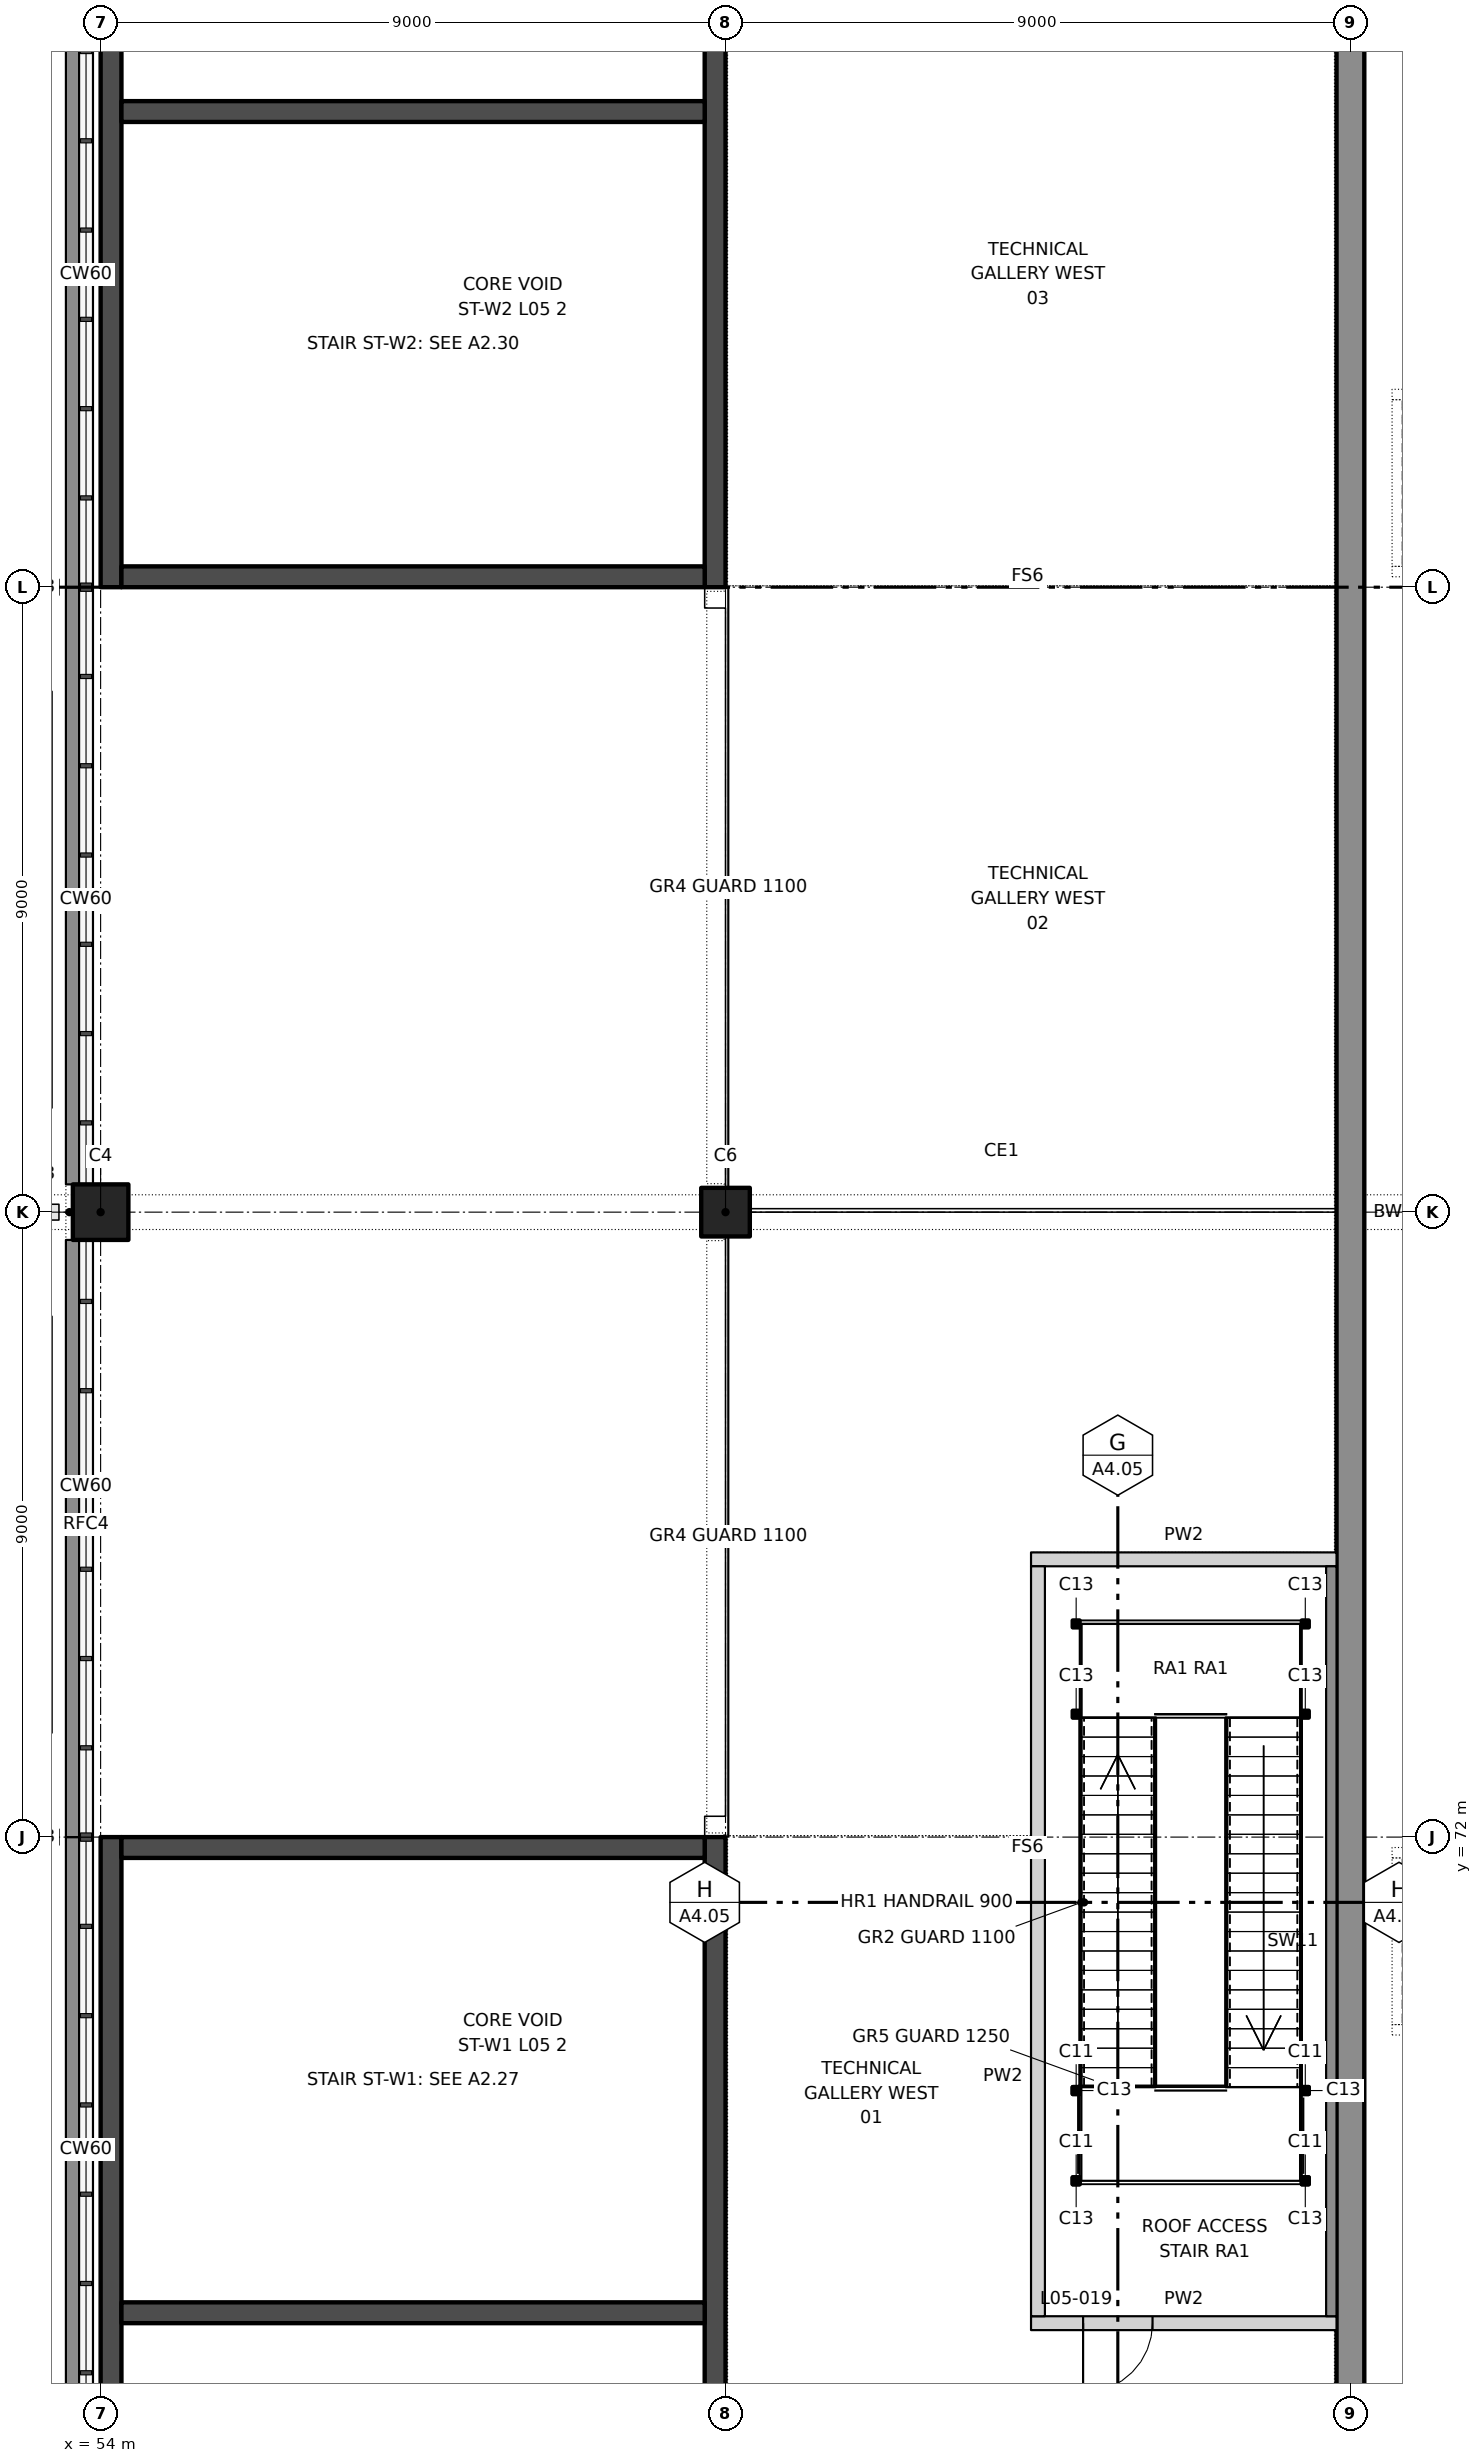
"""IFC4 building model, lengths in metres.
Left out: names, types, materials, properties, quantities, classifications, styles, units other than length and angle.
Written with IfcOpenShell. Run it as: python <this file> out.ifc"""

import sys

from ifc_helpers import new_model, si_unit, direction, frame, frame_2d, origin, origin_2d, place, context, subcontext, project, spatial, rectangle, hollow_rectangle, extrude, element, fill, save


model = new_model("IFC4")
c1 = context("Model", 3, precision=1e-05, world=origin(), true_north=direction((0.0, 1.0)))
c2 = subcontext(c1, "Body", "Model", "MODEL_VIEW")
j1 = project(units=[si_unit("LENGTHUNIT", "METRE"), si_unit("PLANEANGLEUNIT", "RADIAN")], contexts=[c1])
p1 = place(None, origin())
s1 = spatial("IfcSite", under=j1, at=p1, CompositionType="ELEMENT")
p2 = place(p1, origin())
s2 = spatial("IfcBuilding", under=s1, at=p2, CompositionType="ELEMENT")
p3 = place(p2, frame((0.0, 0.0, 33.5)))
s3 = spatial("IfcBuildingStorey", under=s2, at=p3, CompositionType="ELEMENT", Elevation=33.5)
p4 = place(p3, frame((54.0, 81.0, 0.0), z_axis=(0.0, 0.0, 1.0), x_axis=(1.0, 0.0, 0.0)))
e1 = element("IfcColumn", 1, at=p4, inside=s3, PredefinedType="COLUMN", context=c2, shape_type="SweptSolid", body=[
    extrude(rectangle(XDim=0.8, YDim=0.8, at=origin_2d()), origin(), (0.0, 0.0, 1.0), 4.0),
])
p5 = place(p3, frame((63.0, 81.0, 0.0), z_axis=(0.0, 0.0, 1.0), x_axis=(1.0, 0.0, 0.0)))
e2 = element("IfcColumn", 2, at=p5, inside=s3, PredefinedType="COLUMN", context=c2, shape_type="SweptSolid", body=[
    extrude(rectangle(XDim=0.7, YDim=0.7, at=origin_2d()), origin(), (0.0, 0.0, 1.0), 4.0),
])
p6 = place(p3, frame((72.0, 99.0, 0.0), z_axis=(0.0, 0.0, 1.0), x_axis=(0.0, -1.0, 0.0)))
e3 = element("IfcWall", 3, at=p6, inside=s3, PredefinedType="SOLIDWALL", context=c2, shape_type="SweptSolid", body=[
    extrude(rectangle(XDim=36.0, YDim=0.4, at=frame_2d((18.0, 0.0))), origin(), (0.0, 0.0, 1.0), 4.0),
])
p7 = place(p2, frame((0.0, 0.0, 28.0)))
s4 = spatial("IfcBuildingStorey", under=s2, at=p7, CompositionType="ELEMENT", Elevation=28.0)
p8 = place(p7, frame((54.4, 81.0, 0.0), z_axis=(0.0, 0.0, 1.0), x_axis=(1.0, 0.0, 0.0)))
e4 = element("IfcWall", 4, at=p8, inside=s4, PredefinedType="PARTITIONING", context=c2, shape_type="SweptSolid", body=[
    extrude(rectangle(XDim=8.25, YDim=0.15, at=frame_2d((4.125, 0.0))), origin(), (0.0, 0.0, 1.0), 9.5),
])
p9 = place(p3, frame((67.4, 65.0, 0.0), z_axis=(0.0, 0.0, 1.0), x_axis=(1.0, 0.0, 0.0)))
e5 = element("IfcWall", 5, at=p9, inside=s3, PredefinedType="PARTITIONING", context=c2, shape_type="SweptSolid", body=[
    extrude(rectangle(XDim=4.4, YDim=0.2, at=frame_2d((2.2, 0.0))), origin(), (0.0, 0.0, 1.0), 12.85),
])
p10 = place(p9, frame((0.75, 0.0, 0.0)))
e6 = element("IfcOpeningElement", 6, at=p10, cuts=e5, PredefinedType="OPENING", context=c2, shape_type="SweptSolid", body=[
    extrude(rectangle(XDim=1.0, YDim=2.1, at=frame_2d((0.5, 1.05))), frame((0.0, 0.11, 0.0), z_axis=(0.0, -1.0, 0.0), x_axis=(1.0, 0.0, 0.0)), (0.0, 0.0, 1.0), 0.22),
])
p11 = place(p3, frame((67.4, 76.0, 0.0), z_axis=(0.0, 0.0, 1.0), x_axis=(1.0, 0.0, 0.0)))
e7 = element("IfcWall", 7, at=p11, inside=s3, PredefinedType="PARTITIONING", context=c2, shape_type="SweptSolid", body=[
    extrude(rectangle(XDim=4.4, YDim=0.2, at=frame_2d((2.2, 0.0))), origin(), (0.0, 0.0, 1.0), 12.85),
])
p12 = place(p3, frame((67.5, 65.1, 0.0), z_axis=(0.0, 0.0, 1.0), x_axis=(0.0, 1.0, 0.0)))
e8 = element("IfcWall", 8, at=p12, inside=s3, PredefinedType="PARTITIONING", context=c2, shape_type="SweptSolid", body=[
    extrude(rectangle(XDim=6.9, YDim=0.2, at=frame_2d((3.45, 0.0))), origin(), (0.0, 0.0, 1.0), 12.85),
])
p13 = place(p3, frame((67.5, 72.0, 0.0), z_axis=(0.0, 0.0, 1.0), x_axis=(0.0, 1.0, 0.0)))
e9 = element("IfcWall", 9, at=p13, inside=s3, PredefinedType="PARTITIONING", context=c2, shape_type="SweptSolid", body=[
    extrude(rectangle(XDim=3.9, YDim=0.2, at=frame_2d((1.95, 0.0))), origin(), (0.0, 0.0, 1.0), 12.85),
])
p14 = place(p3, frame((53.675, 72.0, 0.0), z_axis=(0.0, 0.0, 1.0), x_axis=(0.0, -1.0, 0.0)))
e10 = element("IfcWall", 10, at=p14, inside=s3, PredefinedType="SOLIDWALL", context=c2, shape_type="SweptSolid", body=[
    extrude(rectangle(XDim=9.0, YDim=0.35, at=frame_2d((4.5, 0.0))), origin(), (0.0, 0.0, 1.0), 4.0),
])
for number, where, z_axis, x_axis in (
    (11, (53.65, 80.6, 0.0), (0.0, 0.0, 1.0), (0.0, -1.0, 0.0)),
    (12, (53.65, 90.0, 0.0), (0.0, 0.0, 1.0), (0.0, -1.0, 0.0)),
):
    element("IfcWall", number, at=place(p3, frame(where, z_axis=z_axis, x_axis=x_axis)), inside=s3, PredefinedType="SOLIDWALL", context=c2, shape_type="SweptSolid", body=[
        extrude(rectangle(XDim=8.6, YDim=0.3, at=frame_2d((4.3, 0.0))), origin(), (0.0, 0.0, 1.0), 4.0),
    ])
p15 = place(p3, frame((53.675, 99.0, 0.0), z_axis=(0.0, 0.0, 1.0), x_axis=(0.0, -1.0, 0.0)))
e13 = element("IfcWall", 13, at=p15, inside=s3, PredefinedType="SOLIDWALL", context=c2, shape_type="SweptSolid", body=[
    extrude(rectangle(XDim=9.0, YDim=0.35, at=frame_2d((4.5, 0.0))), origin(), (0.0, 0.0, 1.0), 4.0),
])
p16 = place(p3, frame((62.85, 54.0, 0.0), z_axis=(0.0, 0.0, 1.0), x_axis=(0.0, 1.0, 0.0)))
e14 = element("IfcWall", 14, at=p16, inside=s3, PredefinedType="SHEAR", context=c2, shape_type="SweptSolid", body=[
    extrude(rectangle(XDim=18.0, YDim=0.3, at=frame_2d((9.0, 0.0))), origin(), (0.0, 0.0, 1.0), 4.0),
])
p17 = place(p16, frame((8.6, 0.0, 0.0)))
e15 = element("IfcOpeningElement", 15, at=p17, cuts=e14, PredefinedType="OPENING", context=c2, shape_type="SweptSolid", body=[
    extrude(rectangle(XDim=1.2, YDim=2.1, at=frame_2d((0.6, 1.05))), frame((0.0, 0.16, 0.0), z_axis=(0.0, -1.0, 0.0), x_axis=(1.0, 0.0, 0.0)), (0.0, 0.0, 1.0), 0.32),
])
p18 = place(p3, frame((54.15, 54.0, 0.0), z_axis=(0.0, 0.0, 1.0), x_axis=(0.0, 1.0, 0.0)))
e16 = element("IfcWall", 16, at=p18, inside=s3, PredefinedType="SHEAR", context=c2, shape_type="SweptSolid", body=[
    extrude(rectangle(XDim=18.0, YDim=0.3, at=frame_2d((9.0, 0.0))), origin(), (0.0, 0.0, 1.0), 4.0),
])
for number, where, z_axis, x_axis in (
    (17, (62.7, 71.85, 0.0), (0.0, 0.0, 1.0), (-1.0, 0.0, 0.0)),
    (18, (62.7, 65.15, 0.0), (0.0, 0.0, 1.0), (-1.0, 0.0, 0.0)),
):
    element("IfcWall", number, at=place(p3, frame(where, z_axis=z_axis, x_axis=x_axis)), inside=s3, PredefinedType="SHEAR", context=c2, shape_type="SweptSolid", body=[
        extrude(rectangle(XDim=8.4, YDim=0.3, at=frame_2d((4.2, 0.0))), origin(), (0.0, 0.0, 1.0), 4.0),
    ])
p19 = place(p3, frame((62.85, 108.0, 0.0), z_axis=(0.0, 0.0, 1.0), x_axis=(0.0, -1.0, 0.0)))
e19 = element("IfcWall", 19, at=p19, inside=s3, PredefinedType="SHEAR", context=c2, shape_type="SweptSolid", body=[
    extrude(rectangle(XDim=18.0, YDim=0.3, at=frame_2d((9.0, 0.0))), origin(), (0.0, 0.0, 1.0), 4.0),
])
p20 = place(p19, frame((8.6, 0.0, 0.0)))
e20 = element("IfcOpeningElement", 20, at=p20, cuts=e19, PredefinedType="OPENING", context=c2, shape_type="SweptSolid", body=[
    extrude(rectangle(XDim=1.2, YDim=2.1, at=frame_2d((0.6, 1.05))), frame((0.0, 0.16, 0.0), z_axis=(0.0, -1.0, 0.0), x_axis=(1.0, 0.0, 0.0)), (0.0, 0.0, 1.0), 0.32),
])
p21 = place(p3, frame((54.15, 108.0, 0.0), z_axis=(0.0, 0.0, 1.0), x_axis=(0.0, -1.0, 0.0)))
e21 = element("IfcWall", 21, at=p21, inside=s3, PredefinedType="SHEAR", context=c2, shape_type="SweptSolid", body=[
    extrude(rectangle(XDim=18.0, YDim=0.3, at=frame_2d((9.0, 0.0))), origin(), (0.0, 0.0, 1.0), 4.0),
])
for number, where, z_axis, x_axis in (
    (22, (62.7, 90.15, 0.0), (0.0, 0.0, 1.0), (-1.0, 0.0, 0.0)),
    (23, (62.7, 96.85, 0.0), (0.0, 0.0, 1.0), (-1.0, 0.0, 0.0)),
):
    element("IfcWall", number, at=place(p3, frame(where, z_axis=z_axis, x_axis=x_axis)), inside=s3, PredefinedType="SHEAR", context=c2, shape_type="SweptSolid", body=[
        extrude(rectangle(XDim=8.4, YDim=0.3, at=frame_2d((4.2, 0.0))), origin(), (0.0, 0.0, 1.0), 4.0),
    ])
for number, where, z_axis, x_axis in (
    (24, (68.05, 67.05, -0.3), (0.0, 0.0, 1.0), (1.0, 0.0, 0.0)),
    (25, (71.35, 67.05, -0.3), (0.0, 0.0, 1.0), (1.0, 0.0, 0.0)),
    (26, (68.05, 68.35, -0.3), (0.0, 0.0, 1.0), (1.0, 0.0, 0.0)),
    (27, (71.35, 68.35, -0.3), (0.0, 0.0, 1.0), (1.0, 0.0, 0.0)),
):
    element("IfcColumn", number, at=place(p3, frame(where, z_axis=z_axis, x_axis=x_axis)), inside=s3, PredefinedType="COLUMN", context=c2, shape_type="SweptSolid", body=[
        extrude(hollow_rectangle(XDim=0.1, YDim=0.1, WallThickness=0.008, at=origin_2d()), origin(), (0.0, 0.0, 1.0), 13.62),
    ])
for number, where, z_axis, x_axis in (
    (28, (68.05, 73.77, -0.3), (0.0, 0.0, 1.0), (1.0, 0.0, 0.0)),
    (29, (71.35, 73.77, -0.3), (0.0, 0.0, 1.0), (1.0, 0.0, 0.0)),
    (30, (68.05, 75.07, -0.3), (0.0, 0.0, 1.0), (1.0, 0.0, 0.0)),
    (31, (71.35, 75.07, -0.3), (0.0, 0.0, 1.0), (1.0, 0.0, 0.0)),
):
    element("IfcColumn", number, at=place(p3, frame(where, z_axis=z_axis, x_axis=x_axis)), inside=s3, PredefinedType="COLUMN", context=c2, shape_type="SweptSolid", body=[
        extrude(hollow_rectangle(XDim=0.1, YDim=0.1, WallThickness=0.008, at=origin_2d()), origin(), (0.0, 0.0, 1.0), 10.42),
    ])
p22 = place(p3, frame((71.725, 65.1, 0.0), z_axis=(0.0, 0.0, 1.0), x_axis=(0.0, 1.0, 0.0)))
e32 = element("IfcWall", 32, at=p22, inside=s3, PredefinedType="SOLIDWALL", context=c2, shape_type="SweptSolid", body=[
    extrude(rectangle(XDim=10.8, YDim=0.15, at=frame_2d((5.4, 0.0))), origin(), (0.0, 0.0, 1.0), 12.85),
])
p23 = place(p10, frame((1.0, 0.0, 0.0), z_axis=(0.0, 0.0, 1.0), x_axis=(-1.0, 0.0, 0.0)))
e33 = element("IfcDoor", 33, at=p23, inside=s3, OperationType="SINGLE_SWING_RIGHT", PredefinedType="DOOR", context=c2, shape_type="SweptSolid", body=[
    extrude(rectangle(XDim=1.0, YDim=2.1, at=frame_2d((0.5, 1.05))), frame((0.0, 0.025, 0.0), z_axis=(0.0, -1.0, 0.0), x_axis=(1.0, 0.0, 0.0)), (0.0, 0.0, 1.0), 0.05),
])
fill(e6, e33)
save(model, sys.argv[1])
